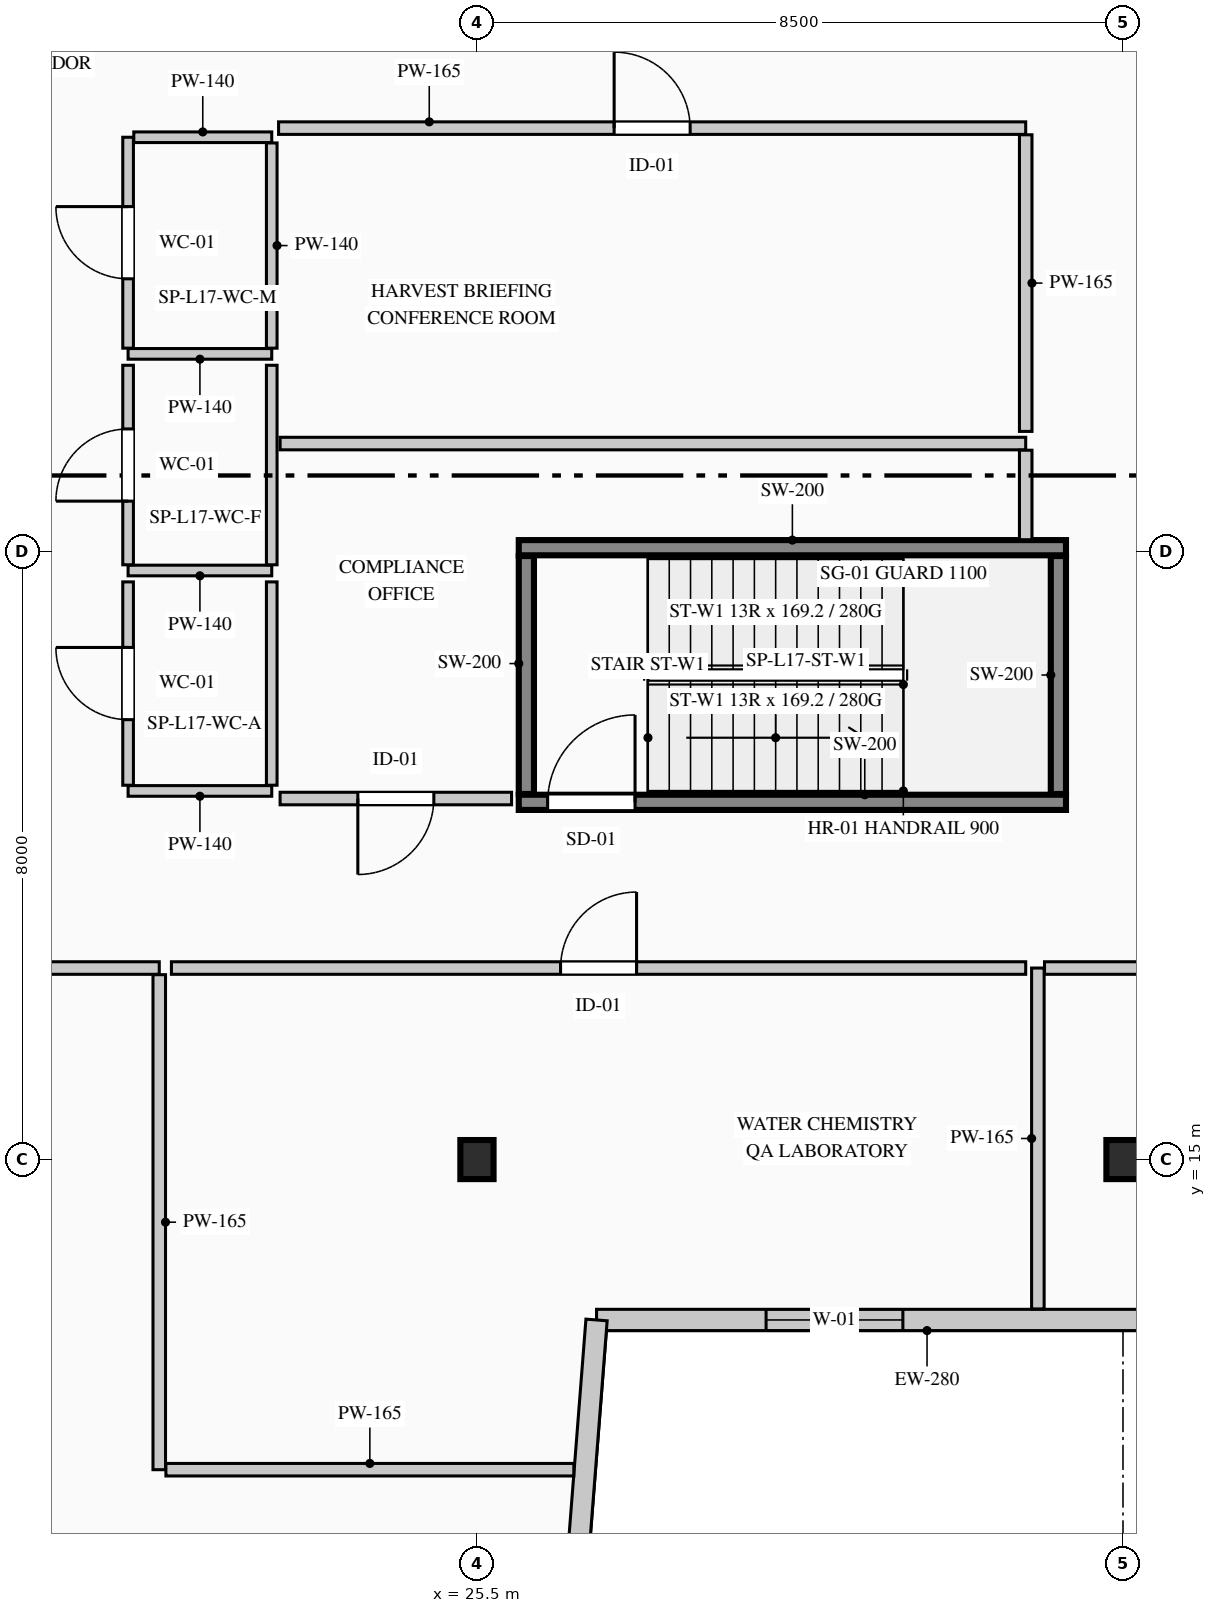
"""IFC4 building model, lengths in metres.
Left out: names, types, materials, properties, quantities, classifications, styles, units other than length and angle.
Written with IfcOpenShell. Run it as: python <this file> out.ifc"""

import sys

from ifc_helpers import new_model, si_unit, direction, frame, frame_2d, origin, origin_2d, place, context, subcontext, project, spatial, rectangle, i_section, extrude, element, fill, save


model = new_model("IFC4")
c1 = context("Model", 3, precision=1e-05, world=origin(), true_north=direction((0.0, 1.0)))
c2 = subcontext(c1, "Body", "Model", "MODEL_VIEW")
j1 = project(units=[si_unit("LENGTHUNIT", "METRE"), si_unit("PLANEANGLEUNIT", "RADIAN")], contexts=[c1])
p1 = place(None, origin())
s1 = spatial("IfcSite", under=j1, at=p1, CompositionType="ELEMENT")
p2 = place(p1, origin())
s2 = spatial("IfcBuilding", under=s1, at=p2, CompositionType="ELEMENT")
p3 = place(p2, frame((0.0, 0.0, 75.4)))
s3 = spatial("IfcBuildingStorey", under=s2, at=p3, CompositionType="ELEMENT", Elevation=75.4)
p4 = place(p3, frame((26.05, 19.7, 0.0), z_axis=(0.0, 0.0, 1.0), x_axis=(1.0, 0.0, 0.0)))
e1 = element("IfcWall", 1, at=p4, inside=s3, PredefinedType="SHEAR", context=c2, shape_type="SweptSolid", body=[
    extrude(rectangle(XDim=7.2, YDim=0.2, at=frame_2d((3.6, 0.0))), origin(), (0.0, 0.0, 1.0), 4.4),
])
p5 = place(p4, frame((0.38, 0.0, 0.0)))
e2 = element("IfcOpeningElement", 2, at=p5, cuts=e1, PredefinedType="OPENING", context=c2, shape_type="SweptSolid", body=[
    extrude(rectangle(XDim=1.15, YDim=2.2, at=frame_2d((0.575, 1.1))), frame((0.0, 0.11, 0.0), z_axis=(0.0, -1.0, 0.0), x_axis=(1.0, 0.0, 0.0)), (0.0, 0.0, 1.0), 0.22),
])
p6 = place(p3, frame((26.05, 23.05, 0.0), z_axis=(0.0, 0.0, 1.0), x_axis=(1.0, 0.0, 0.0)))
e3 = element("IfcWall", 3, at=p6, inside=s3, PredefinedType="SHEAR", context=c2, shape_type="SweptSolid", body=[
    extrude(rectangle(XDim=7.2, YDim=0.2, at=frame_2d((3.6, 0.0))), origin(), (0.0, 0.0, 1.0), 4.4),
])
for number, where, z_axis, x_axis in (
    (4, (26.15, 19.81, 0.0), (0.0, 0.0, 1.0), (0.0, 1.0, 0.0)),
    (5, (33.15, 19.81, 0.0), (0.0, 0.0, 1.0), (0.0, 1.0, 0.0)),
):
    element("IfcWall", number, at=place(p3, frame(where, z_axis=z_axis, x_axis=x_axis)), inside=s3, PredefinedType="SHEAR", context=c2, shape_type="SweptSolid", body=[
        extrude(rectangle(XDim=3.13, YDim=0.2, at=frame_2d((1.565, 0.0))), origin(), (0.0, 0.0, 1.0), 4.4),
    ])
for number, where, z_axis, x_axis in (
    (6, (25.5, 15.0, 0.0), (0.0, 0.0, 1.0), (1.0, 0.0, 0.0)),
    (7, (34.0, 15.0, 0.0), (0.0, 0.0, 1.0), (1.0, 0.0, 0.0)),
):
    element("IfcColumn", number, at=place(p3, frame(where, z_axis=z_axis, x_axis=x_axis)), inside=s3, PredefinedType="COLUMN", context=c2, shape_type="SweptSolid", body=[
        extrude(i_section(OverallWidth=0.437, OverallDepth=0.514, WebThickness=0.061, FlangeThickness=0.077, FilletRadius=0.015, at=origin_2d()), origin(), (0.0, 0.0, 1.0), 4.4),
    ])
p7 = place(p3, frame((35.77, 12.89, 0.0), z_axis=(0.0, 0.0, 1.0), x_axis=(-1.0, 0.0, 0.0)))
e8 = element("IfcWall", 8, at=p7, inside=s3, PredefinedType="STANDARD", context=c2, shape_type="SweptSolid", body=[
    extrude(rectangle(XDim=8.697, YDim=0.28, at=frame_2d((4.348, 0.0))), origin(), (0.0, 0.0, 1.0), 4.115),
])
p8 = place(p7, frame((4.666, 0.0, 0.9)))
e9 = element("IfcOpeningElement", 9, at=p8, cuts=e8, PredefinedType="OPENING", context=c2, shape_type="SweptSolid", body=[
    extrude(rectangle(XDim=1.8, YDim=2.1, at=frame_2d((0.9, 1.05))), frame((0.0, 0.15, 0.0), z_axis=(0.0, -1.0, 0.0), x_axis=(1.0, 0.0, 0.0)), (0.0, 0.0, 1.0), 0.3),
])
p9 = place(p3, frame((27.073, 12.89, 0.0), z_axis=(0.0, 0.0, 1.0), x_axis=(-0.077816860153, -0.996967670627, 0.0)))
e10 = element("IfcWall", 10, at=p9, inside=s3, PredefinedType="STANDARD", context=c2, shape_type="SweptSolid", body=[
    extrude(rectangle(XDim=10.281, YDim=0.28, at=frame_2d((5.141, 0.0))), origin(), (0.0, 0.0, 1.0), 4.115),
])
p10 = place(p3, frame((22.8, 25.6, 0.0), z_axis=(0.0, 0.0, 1.0), x_axis=(-1.0, 0.0, 0.0)))
e11 = element("IfcWall", 11, at=p10, inside=s3, PredefinedType="PARTITIONING", context=c2, shape_type="SweptSolid", body=[
    extrude(rectangle(XDim=1.89, YDim=0.14, at=frame_2d((0.945, 0.0))), origin(), (0.0, 0.0, 1.0), 4.115),
])
p11 = place(p3, frame((20.91, 25.675, 0.0), z_axis=(0.0, 0.0, 1.0), x_axis=(0.0, 1.0, 0.0)))
e12 = element("IfcWall", 12, at=p11, inside=s3, PredefinedType="PARTITIONING", context=c2, shape_type="SweptSolid", body=[
    extrude(rectangle(XDim=2.775, YDim=0.14, at=frame_2d((1.387, 0.0))), origin(), (0.0, 0.0, 1.0), 4.115),
])
p12 = place(p11, frame((0.913, 0.0, 0.0)))
e13 = element("IfcOpeningElement", 13, at=p12, cuts=e12, PredefinedType="OPENING", context=c2, shape_type="SweptSolid", body=[
    extrude(rectangle(XDim=0.95, YDim=2.15, at=frame_2d((0.475, 1.075))), frame((0.0, 0.08, 0.0), z_axis=(0.0, -1.0, 0.0), x_axis=(1.0, 0.0, 0.0)), (0.0, 0.0, 1.0), 0.16),
])
p13 = place(p3, frame((20.985, 28.45, 0.0), z_axis=(0.0, 0.0, 1.0), x_axis=(1.0, 0.0, 0.0)))
e14 = element("IfcWall", 14, at=p13, inside=s3, PredefinedType="PARTITIONING", context=c2, shape_type="SweptSolid", body=[
    extrude(rectangle(XDim=1.815, YDim=0.14, at=frame_2d((0.907, 0.0))), origin(), (0.0, 0.0, 1.0), 4.115),
])
p14 = place(p3, frame((22.8, 28.375, 0.0), z_axis=(0.0, 0.0, 1.0), x_axis=(0.0, -1.0, 0.0)))
e15 = element("IfcWall", 15, at=p14, inside=s3, PredefinedType="PARTITIONING", context=c2, shape_type="SweptSolid", body=[
    extrude(rectangle(XDim=2.7, YDim=0.14, at=frame_2d((1.35, 0.0))), origin(), (0.0, 0.0, 1.0), 3.74),
])
p15 = place(p3, frame((22.8, 22.75, 0.0), z_axis=(0.0, 0.0, 1.0), x_axis=(-1.0, 0.0, 0.0)))
e16 = element("IfcWall", 16, at=p15, inside=s3, PredefinedType="PARTITIONING", context=c2, shape_type="SweptSolid", body=[
    extrude(rectangle(XDim=1.89, YDim=0.14, at=frame_2d((0.945, 0.0))), origin(), (0.0, 0.0, 1.0), 4.115),
])
p16 = place(p3, frame((20.91, 22.825, 0.0), z_axis=(0.0, 0.0, 1.0), x_axis=(0.0, 1.0, 0.0)))
e17 = element("IfcWall", 17, at=p16, inside=s3, PredefinedType="PARTITIONING", context=c2, shape_type="SweptSolid", body=[
    extrude(rectangle(XDim=2.625, YDim=0.14, at=frame_2d((1.312, 0.0))), origin(), (0.0, 0.0, 1.0), 4.115),
])
p17 = place(p16, frame((0.837, 0.0, 0.0)))
e18 = element("IfcOpeningElement", 18, at=p17, cuts=e17, PredefinedType="OPENING", context=c2, shape_type="SweptSolid", body=[
    extrude(rectangle(XDim=0.95, YDim=2.15, at=frame_2d((0.475, 1.075))), frame((0.0, 0.08, 0.0), z_axis=(0.0, -1.0, 0.0), x_axis=(1.0, 0.0, 0.0)), (0.0, 0.0, 1.0), 0.16),
])
p18 = place(p3, frame((22.8, 25.45, 0.0), z_axis=(0.0, 0.0, 1.0), x_axis=(0.0, -1.0, 0.0)))
e19 = element("IfcWall", 19, at=p18, inside=s3, PredefinedType="PARTITIONING", context=c2, shape_type="SweptSolid", body=[
    extrude(rectangle(XDim=2.625, YDim=0.14, at=frame_2d((1.312, 0.0))), origin(), (0.0, 0.0, 1.0), 3.74),
])
p19 = place(p3, frame((22.8, 19.85, 0.0), z_axis=(0.0, 0.0, 1.0), x_axis=(-1.0, 0.0, 0.0)))
e20 = element("IfcWall", 20, at=p19, inside=s3, PredefinedType="PARTITIONING", context=c2, shape_type="SweptSolid", body=[
    extrude(rectangle(XDim=1.89, YDim=0.14, at=frame_2d((0.945, 0.0))), origin(), (0.0, 0.0, 1.0), 4.115),
])
p20 = place(p3, frame((20.91, 19.925, 0.0), z_axis=(0.0, 0.0, 1.0), x_axis=(0.0, 1.0, 0.0)))
e21 = element("IfcWall", 21, at=p20, inside=s3, PredefinedType="PARTITIONING", context=c2, shape_type="SweptSolid", body=[
    extrude(rectangle(XDim=2.675, YDim=0.14, at=frame_2d((1.337, 0.0))), origin(), (0.0, 0.0, 1.0), 4.115),
])
p21 = place(p20, frame((0.863, 0.0, 0.0)))
e22 = element("IfcOpeningElement", 22, at=p21, cuts=e21, PredefinedType="OPENING", context=c2, shape_type="SweptSolid", body=[
    extrude(rectangle(XDim=0.95, YDim=2.15, at=frame_2d((0.475, 1.075))), frame((0.0, 0.08, 0.0), z_axis=(0.0, -1.0, 0.0), x_axis=(1.0, 0.0, 0.0)), (0.0, 0.0, 1.0), 0.16),
])
p22 = place(p3, frame((22.8, 22.6, 0.0), z_axis=(0.0, 0.0, 1.0), x_axis=(0.0, -1.0, 0.0)))
e23 = element("IfcWall", 23, at=p22, inside=s3, PredefinedType="PARTITIONING", context=c2, shape_type="SweptSolid", body=[
    extrude(rectangle(XDim=2.675, YDim=0.14, at=frame_2d((1.337, 0.0))), origin(), (0.0, 0.0, 1.0), 3.74),
])
p23 = place(p3, frame((11.88, 17.52, 0.0), z_axis=(0.0, 0.0, 1.0), x_axis=(1.0, 0.0, 0.0)))
e24 = element("IfcWall", 24, at=p23, inside=s3, PredefinedType="PARTITIONING", context=c2, shape_type="SweptSolid", body=[
    extrude(rectangle(XDim=9.44, YDim=0.165, at=frame_2d((4.72, 0.0))), origin(), (0.0, 0.0, 1.0), 4.115),
])
p24 = place(p23, frame((4.22, 0.0, 0.0)))
e25 = element("IfcOpeningElement", 25, at=p24, cuts=e24, PredefinedType="OPENING", context=c2, shape_type="SweptSolid", body=[
    extrude(rectangle(XDim=1.0, YDim=2.15, at=frame_2d((0.5, 1.075))), frame((0.0, 0.093, 0.0), z_axis=(0.0, -1.0, 0.0), x_axis=(1.0, 0.0, 0.0)), (0.0, 0.0, 1.0), 0.185),
])
p25 = place(p3, frame((21.32, 17.433, 0.0), z_axis=(0.0, 0.0, 1.0), x_axis=(0.0, -1.0, 0.0)))
e26 = element("IfcWall", 26, at=p25, inside=s3, PredefinedType="PARTITIONING", context=c2, shape_type="SweptSolid", body=[
    extrude(rectangle(XDim=6.513, YDim=0.165, at=frame_2d((3.256, 0.0))), origin(), (0.0, 0.0, 1.0), 3.74),
])
p26 = place(p3, frame((21.407, 10.92, 0.0), z_axis=(0.0, 0.0, 1.0), x_axis=(1.0, 0.0, 0.0)))
e27 = element("IfcWall", 27, at=p26, inside=s3, PredefinedType="PARTITIONING", context=c2, shape_type="SweptSolid", body=[
    extrude(rectangle(XDim=5.367, YDim=0.165, at=frame_2d((2.684, 0.0))), origin(), (0.0, 0.0, 1.0), 4.115),
])
p27 = place(p3, frame((32.88, 13.035, 0.0), z_axis=(0.0, 0.0, 1.0), x_axis=(0.0, 1.0, 0.0)))
e28 = element("IfcWall", 28, at=p27, inside=s3, PredefinedType="PARTITIONING", context=c2, shape_type="SweptSolid", body=[
    extrude(rectangle(XDim=4.485, YDim=0.165, at=frame_2d((2.243, 0.0))), origin(), (0.0, 0.0, 1.0), 4.115),
])
p28 = place(p3, frame((32.968, 17.52, 0.0), z_axis=(0.0, 0.0, 1.0), x_axis=(1.0, 0.0, 0.0)))
e29 = element("IfcWall", 29, at=p28, inside=s3, PredefinedType="PARTITIONING", context=c2, shape_type="SweptSolid", body=[
    extrude(rectangle(XDim=12.012, YDim=0.165, at=frame_2d((6.006, 0.0))), origin(), (0.0, 0.0, 1.0), 3.9),
])
p29 = place(p28, frame((5.506, 0.0, 0.0)))
e30 = element("IfcOpeningElement", 30, at=p29, cuts=e29, PredefinedType="OPENING", context=c2, shape_type="SweptSolid", body=[
    extrude(rectangle(XDim=1.0, YDim=2.15, at=frame_2d((0.5, 1.075))), frame((0.0, 0.093, 0.0), z_axis=(0.0, -1.0, 0.0), x_axis=(1.0, 0.0, 0.0)), (0.0, 0.0, 1.0), 0.185),
])
p30 = place(p3, frame((21.48, 17.52, 0.0), z_axis=(0.0, 0.0, 1.0), x_axis=(1.0, 0.0, 0.0)))
e31 = element("IfcWall", 31, at=p30, inside=s3, PredefinedType="PARTITIONING", context=c2, shape_type="SweptSolid", body=[
    extrude(rectangle(XDim=11.24, YDim=0.165, at=frame_2d((5.62, 0.0))), origin(), (0.0, 0.0, 1.0), 3.9),
])
p31 = place(p30, frame((5.12, 0.0, 0.0)))
e32 = element("IfcOpeningElement", 32, at=p31, cuts=e31, PredefinedType="OPENING", context=c2, shape_type="SweptSolid", body=[
    extrude(rectangle(XDim=1.0, YDim=2.15, at=frame_2d((0.5, 1.075))), frame((0.0, 0.093, 0.0), z_axis=(0.0, -1.0, 0.0), x_axis=(1.0, 0.0, 0.0)), (0.0, 0.0, 1.0), 0.185),
])
p32 = place(p3, frame((25.956, 19.75, 0.0), z_axis=(0.0, 0.0, 1.0), x_axis=(-1.0, 0.0, 0.0)))
e33 = element("IfcWall", 33, at=p32, inside=s3, PredefinedType="PARTITIONING", context=c2, shape_type="SweptSolid", body=[
    extrude(rectangle(XDim=3.046, YDim=0.165, at=frame_2d((1.523, 0.0))), origin(), (0.0, 0.0, 1.0), 4.115),
])
p33 = place(p32, frame((1.023, 0.0, 0.0)))
e34 = element("IfcOpeningElement", 34, at=p33, cuts=e33, PredefinedType="OPENING", context=c2, shape_type="SweptSolid", body=[
    extrude(rectangle(XDim=1.0, YDim=2.15, at=frame_2d((0.5, 1.075))), frame((0.0, 0.093, 0.0), z_axis=(0.0, -1.0, 0.0), x_axis=(1.0, 0.0, 0.0)), (0.0, 0.0, 1.0), 0.185),
])
p34 = place(p3, frame((22.91, 24.42, 0.0), z_axis=(0.0, 0.0, 1.0), x_axis=(1.0, 0.0, 0.0)))
e35 = element("IfcWall", 35, at=p34, inside=s3, PredefinedType="PARTITIONING", context=c2, shape_type="SweptSolid", body=[
    extrude(rectangle(XDim=9.81, YDim=0.165, at=frame_2d((4.905, 0.0))), origin(), (0.0, 0.0, 1.0), 3.74),
])
p35 = place(p3, frame((32.72, 24.333, 0.0), z_axis=(0.0, 0.0, 1.0), x_axis=(0.0, -1.0, 0.0)))
e36 = element("IfcWall", 36, at=p35, inside=s3, PredefinedType="PARTITIONING", context=c2, shape_type="SweptSolid", body=[
    extrude(rectangle(XDim=1.177, YDim=0.165, at=frame_2d((0.589, 0.0))), origin(), (0.0, 0.0, 1.0), 4.115),
])
p36 = place(p3, frame((22.89, 28.57, 0.0), z_axis=(0.0, 0.0, 1.0), x_axis=(1.0, 0.0, 0.0)))
e37 = element("IfcWall", 37, at=p36, inside=s3, PredefinedType="PARTITIONING", context=c2, shape_type="SweptSolid", body=[
    extrude(rectangle(XDim=9.83, YDim=0.165, at=frame_2d((4.915, 0.0))), origin(), (0.0, 0.0, 1.0), 3.9),
])
p37 = place(p36, frame((4.415, 0.0, 0.0)))
e38 = element("IfcOpeningElement", 38, at=p37, cuts=e37, PredefinedType="OPENING", context=c2, shape_type="SweptSolid", body=[
    extrude(rectangle(XDim=1.0, YDim=2.15, at=frame_2d((0.5, 1.075))), frame((0.0, 0.093, 0.0), z_axis=(0.0, -1.0, 0.0), x_axis=(1.0, 0.0, 0.0)), (0.0, 0.0, 1.0), 0.185),
])
p38 = place(p3, frame((32.72, 28.482, 0.0), z_axis=(0.0, 0.0, 1.0), x_axis=(0.0, -1.0, 0.0)))
e39 = element("IfcWall", 39, at=p38, inside=s3, PredefinedType="PARTITIONING", context=c2, shape_type="SweptSolid", body=[
    extrude(rectangle(XDim=3.902, YDim=0.165, at=frame_2d((1.951, 0.0))), origin(), (0.0, 0.0, 1.0), 4.115),
])
p39 = place(p8, origin())
e40 = element("IfcWindow", 40, at=p39, inside=s3, PartitioningType="SINGLE_PANEL", PredefinedType="WINDOW", context=c2, shape_type="SweptSolid", body=[
    extrude(rectangle(XDim=1.8, YDim=2.1, at=frame_2d((0.9, 1.05))), frame((0.0, 0.03, 0.0), z_axis=(0.0, -1.0, 0.0), x_axis=(1.0, 0.0, 0.0)), (0.0, 0.0, 1.0), 0.06),
])
fill(e9, e40)
p40 = place(p5, origin())
e41 = element("IfcDoor", 41, at=p40, inside=s3, OperationType="SINGLE_SWING_RIGHT", PredefinedType="DOOR", context=c2, shape_type="SweptSolid", body=[
    extrude(rectangle(XDim=1.15, YDim=2.2, at=frame_2d((0.575, 1.1))), frame((0.0, 0.025, 0.0), z_axis=(0.0, -1.0, 0.0), x_axis=(1.0, 0.0, 0.0)), (0.0, 0.0, 1.0), 0.05),
])
fill(e2, e41)
p41 = place(p12, origin())
e42 = element("IfcDoor", 42, at=p41, inside=s3, OperationType="SINGLE_SWING_RIGHT", PredefinedType="DOOR", context=c2, shape_type="SweptSolid", body=[
    extrude(rectangle(XDim=0.95, YDim=2.15, at=frame_2d((0.475, 1.075))), frame((0.0, 0.025, 0.0), z_axis=(0.0, -1.0, 0.0), x_axis=(1.0, 0.0, 0.0)), (0.0, 0.0, 1.0), 0.05),
])
fill(e13, e42)
p42 = place(p17, origin())
e43 = element("IfcDoor", 43, at=p42, inside=s3, OperationType="SINGLE_SWING_LEFT", PredefinedType="DOOR", context=c2, shape_type="SweptSolid", body=[
    extrude(rectangle(XDim=0.95, YDim=2.15, at=frame_2d((0.475, 1.075))), frame((0.0, 0.025, 0.0), z_axis=(0.0, -1.0, 0.0), x_axis=(1.0, 0.0, 0.0)), (0.0, 0.0, 1.0), 0.05),
])
fill(e18, e43)
p43 = place(p21, origin())
e44 = element("IfcDoor", 44, at=p43, inside=s3, OperationType="SINGLE_SWING_RIGHT", PredefinedType="DOOR", context=c2, shape_type="SweptSolid", body=[
    extrude(rectangle(XDim=0.95, YDim=2.15, at=frame_2d((0.475, 1.075))), frame((0.0, 0.025, 0.0), z_axis=(0.0, -1.0, 0.0), x_axis=(1.0, 0.0, 0.0)), (0.0, 0.0, 1.0), 0.05),
])
fill(e22, e44)
p44 = place(p31, origin())
e45 = element("IfcDoor", 45, at=p44, inside=s3, OperationType="SINGLE_SWING_RIGHT", PredefinedType="DOOR", context=c2, shape_type="SweptSolid", body=[
    extrude(rectangle(XDim=1.0, YDim=2.15, at=frame_2d((0.5, 1.075))), frame((0.0, 0.025, 0.0), z_axis=(0.0, -1.0, 0.0), x_axis=(1.0, 0.0, 0.0)), (0.0, 0.0, 1.0), 0.05),
])
fill(e32, e45)
p45 = place(p33, origin())
e46 = element("IfcDoor", 46, at=p45, inside=s3, OperationType="SINGLE_SWING_RIGHT", PredefinedType="DOOR", context=c2, shape_type="SweptSolid", body=[
    extrude(rectangle(XDim=1.0, YDim=2.15, at=frame_2d((0.5, 1.075))), frame((0.0, 0.025, 0.0), z_axis=(0.0, -1.0, 0.0), x_axis=(1.0, 0.0, 0.0)), (0.0, 0.0, 1.0), 0.05),
])
fill(e34, e46)
p46 = place(p37, origin())
e47 = element("IfcDoor", 47, at=p46, inside=s3, OperationType="SINGLE_SWING_LEFT", PredefinedType="DOOR", context=c2, shape_type="SweptSolid", body=[
    extrude(rectangle(XDim=1.0, YDim=2.15, at=frame_2d((0.5, 1.075))), frame((0.0, 0.025, 0.0), z_axis=(0.0, -1.0, 0.0), x_axis=(1.0, 0.0, 0.0)), (0.0, 0.0, 1.0), 0.05),
])
fill(e38, e47)
save(model, sys.argv[1])
